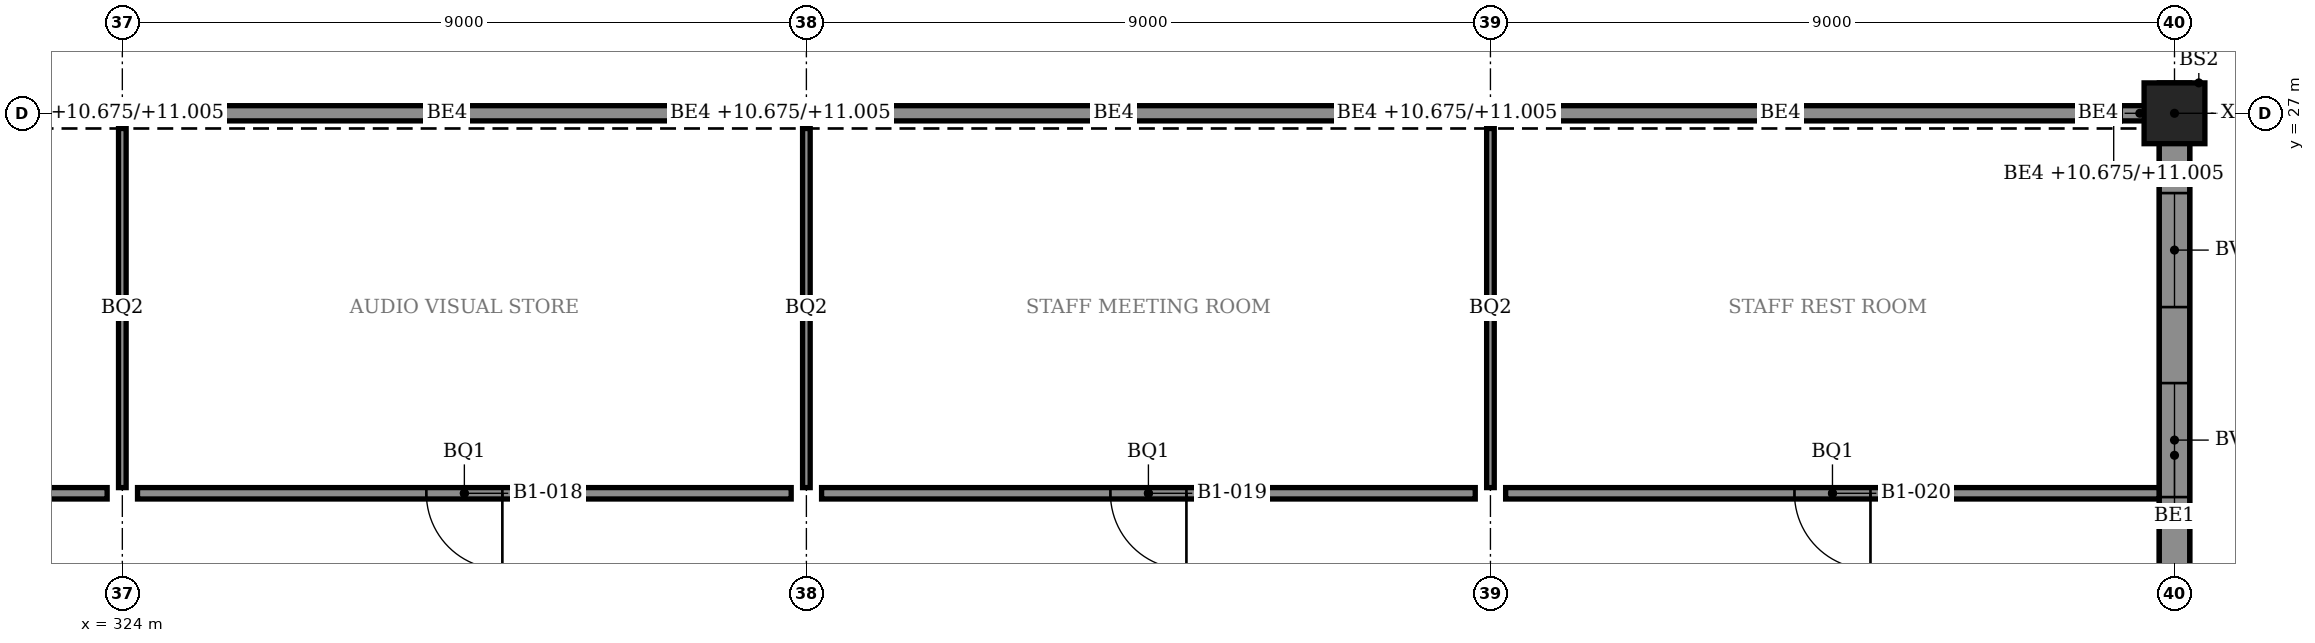
"""IFC4 building model, lengths in metres.
Left out: names, types, materials, properties, quantities, classifications, styles, units other than length and angle.
Written with IfcOpenShell. Run it as: python <this file> out.ifc"""

import sys

from ifc_helpers import new_model, si_unit, direction, frame, frame_2d, origin, origin_2d, place, context, subcontext, project, spatial, rectangle, extrude, element, fill, save


model = new_model("IFC4")
c1 = context("Model", 3, precision=1e-05, world=origin(), true_north=direction((0.0, 1.0)))
c2 = subcontext(c1, "Body", "Model", "MODEL_VIEW")
j1 = project(units=[si_unit("LENGTHUNIT", "METRE"), si_unit("PLANEANGLEUNIT", "RADIAN")], contexts=[c1])
p1 = place(None, origin())
s1 = spatial("IfcSite", under=j1, at=p1, CompositionType="ELEMENT")
p2 = place(p1, origin())
s2 = spatial("IfcBuilding", under=s1, at=p2, CompositionType="ELEMENT")
p3 = place(p2, frame((0.0, 0.0, 6.0)))
s3 = spatial("IfcBuildingStorey", under=s2, at=p3, CompositionType="ELEMENT", Elevation=6.0)
p4 = place(p3, frame((351.0, 27.0, 0.0), z_axis=(0.0, 0.0, 1.0), x_axis=(1.0, 0.0, 0.0)))
e1 = element("IfcColumn", 1, at=p4, inside=s3, PredefinedType="COLUMN", context=c2, shape_type="SweptSolid", body=[
    extrude(rectangle(XDim=0.8, YDim=0.8, at=origin_2d()), origin(), (0.0, 0.0, 1.0), 3.75),
])
p5 = place(p2, origin())
s4 = spatial("IfcBuildingStorey", under=s2, at=p5, CompositionType="ELEMENT", Elevation=0.0)
p6 = place(p5, frame((288.4, 27.0, -0.3), z_axis=(0.0, 0.0, 1.0), x_axis=(1.0, 0.0, 0.0)))
e2 = element("IfcWall", 2, at=p6, inside=s4, PredefinedType="SHEAR", context=c2, shape_type="SweptSolid", body=[
    extrude(rectangle(XDim=62.2, YDim=0.4, at=frame_2d((31.1, 0.0))), origin(), (0.0, 0.0, 1.0), 10.625),
])
p7 = place(p6, frame((22.4, 0.0, 0.3)))
e3 = element("IfcOpeningElement", 3, at=p7, cuts=e2, PredefinedType="OPENING", context=c2, shape_type="SweptSolid", body=[
    extrude(rectangle(XDim=2.4, YDim=2.4, at=frame_2d((1.2, 1.2))), frame((0.0, 0.21, 0.0), z_axis=(0.0, -1.0, 0.0), x_axis=(1.0, 0.0, 0.0)), (0.0, 0.0, 1.0), 0.42),
])
p8 = place(p6, frame((38.9, 0.0, 0.3)))
e4 = element("IfcOpeningElement", 4, at=p8, cuts=e2, PredefinedType="OPENING", context=c2, shape_type="SweptSolid", body=[
    extrude(rectangle(XDim=2.4, YDim=2.4, at=frame_2d((1.2, 1.2))), frame((0.0, 0.21, 0.0), z_axis=(0.0, -1.0, 0.0), x_axis=(1.0, 0.0, 0.0)), (0.0, 0.0, 1.0), 0.42),
])
p9 = place(p3, frame((351.0, 18.4, 0.0), z_axis=(0.0, 0.0, 1.0), x_axis=(0.0, 1.0, 0.0)))
e5 = element("IfcWall", 5, at=p9, inside=s3, PredefinedType="STANDARD", context=c2, shape_type="SweptSolid", body=[
    extrude(rectangle(XDim=8.2, YDim=0.4, at=frame_2d((4.1, 0.0))), origin(), (0.0, 0.0, 1.0), 3.05),
])
p10 = place(p9, frame((1.05, 0.0, 0.9)))
e6 = element("IfcOpeningElement", 6, at=p10, cuts=e5, PredefinedType="OPENING", context=c2, shape_type="SweptSolid", body=[
    extrude(rectangle(XDim=1.5, YDim=1.8, at=frame_2d((0.75, 0.9))), frame((0.0, 0.21, 0.0), z_axis=(0.0, -1.0, 0.0), x_axis=(1.0, 0.0, 0.0)), (0.0, 0.0, 1.0), 0.42),
])
p11 = place(p9, frame((3.55, 0.0, 0.9)))
e7 = element("IfcOpeningElement", 7, at=p11, cuts=e5, PredefinedType="OPENING", context=c2, shape_type="SweptSolid", body=[
    extrude(rectangle(XDim=1.5, YDim=1.8, at=frame_2d((0.75, 0.9))), frame((0.0, 0.21, 0.0), z_axis=(0.0, -1.0, 0.0), x_axis=(1.0, 0.0, 0.0)), (0.0, 0.0, 1.0), 0.42),
])
p12 = place(p9, frame((6.05, 0.0, 0.9)))
e8 = element("IfcOpeningElement", 8, at=p12, cuts=e5, PredefinedType="OPENING", context=c2, shape_type="SweptSolid", body=[
    extrude(rectangle(XDim=1.5, YDim=1.8, at=frame_2d((0.75, 0.9))), frame((0.0, 0.21, 0.0), z_axis=(0.0, -1.0, 0.0), x_axis=(1.0, 0.0, 0.0)), (0.0, 0.0, 1.0), 0.42),
])
p13 = place(p3, frame((351.0, 9.2, 4.0), z_axis=(0.0, 0.0, 1.0), x_axis=(0.0, 1.0, 0.0)))
e9 = element("IfcWall", 9, at=p13, inside=s3, PredefinedType="PARAPET", context=c2, shape_type="SweptSolid", body=[
    extrude(rectangle(XDim=18.2, YDim=0.4, at=frame_2d((9.1, 0.0))), origin(), (0.0, 0.0, 1.0), 1.121),
])
p14 = place(p3, frame((315.202, 27.0, 4.325), z_axis=(0.0, 0.0, 1.0), x_axis=(1.0, 0.0, 0.0)))
e10 = element("IfcWall", 10, at=p14, inside=s3, PredefinedType="STANDARD", context=c2, shape_type="SweptSolid", body=[
    extrude(rectangle(XDim=8.596, YDim=0.2, at=frame_2d((4.298, 0.0))), origin(), (0.0, 0.0, 1.0), 1.061),
])
for number, where, z_axis, x_axis in (
    (11, (323.973, 27.0, 4.325), (0.0, 0.0, 1.0), (1.0, 0.0, 0.0)),
    (12, (332.745, 27.0, 4.325), (0.0, 0.0, 1.0), (1.0, 0.0, 0.0)),
    (13, (341.516, 27.0, 4.325), (0.0, 0.0, 1.0), (1.0, 0.0, 0.0)),
):
    element("IfcWall", number, at=place(p3, frame(where, z_axis=z_axis, x_axis=x_axis)), inside=s3, PredefinedType="STANDARD", context=c2, shape_type="SweptSolid", body=[
        extrude(rectangle(XDim=8.596, YDim=0.2, at=frame_2d((4.298, 0.0))), origin(), (0.0, 0.0, 1.0), 1.061),
    ])
p15 = place(p3, frame((350.288, 27.0, 4.325), z_axis=(0.0, 0.0, 1.0), x_axis=(1.0, 0.0, 0.0)))
e14 = element("IfcWall", 14, at=p15, inside=s3, PredefinedType="STANDARD", context=c2, shape_type="SweptSolid", body=[
    extrude(rectangle(XDim=0.512, YDim=0.2, at=frame_2d((0.256, 0.0))), origin(), (0.0, 0.0, 1.0), 1.061),
])
for number, where, z_axis, x_axis in (
    (15, (323.798, 27.0, 4.675), (0.0, 0.0, 1.0), (1.0, 0.0, 0.0)),
    (16, (332.57, 27.0, 4.675), (0.0, 0.0, 1.0), (1.0, 0.0, 0.0)),
    (17, (341.341, 27.0, 4.675), (0.0, 0.0, 1.0), (1.0, 0.0, 0.0)),
    (18, (350.113, 27.0, 4.675), (0.0, 0.0, 1.0), (1.0, 0.0, 0.0)),
):
    element("IfcWall", number, at=place(p3, frame(where, z_axis=z_axis, x_axis=x_axis)), inside=s3, PredefinedType="STANDARD", context=c2, shape_type="SweptSolid", body=[
        extrude(rectangle(XDim=0.175, YDim=0.2, at=frame_2d((0.087, 0.0))), origin(), (0.0, 0.0, 1.0), 0.33),
    ])
p16 = place(p3, frame((315.2, 22.0, 0.0), z_axis=(0.0, 0.0, 1.0), x_axis=(1.0, 0.0, 0.0)))
e19 = element("IfcWall", 19, at=p16, inside=s3, PredefinedType="PARTITIONING", context=c2, shape_type="SweptSolid", body=[
    extrude(rectangle(XDim=8.6, YDim=0.15, at=frame_2d((4.3, 0.0))), origin(), (0.0, 0.0, 1.0), 3.75),
])
p17 = place(p3, frame((324.2, 22.0, 0.0), z_axis=(0.0, 0.0, 1.0), x_axis=(1.0, 0.0, 0.0)))
e20 = element("IfcWall", 20, at=p17, inside=s3, PredefinedType="PARTITIONING", context=c2, shape_type="SweptSolid", body=[
    extrude(rectangle(XDim=8.6, YDim=0.15, at=frame_2d((4.3, 0.0))), origin(), (0.0, 0.0, 1.0), 3.75),
])
p18 = place(p17, frame((3.8, 0.0, 0.0)))
e21 = element("IfcOpeningElement", 21, at=p18, cuts=e20, PredefinedType="OPENING", context=c2, shape_type="SweptSolid", body=[
    extrude(rectangle(XDim=1.0, YDim=2.4, at=frame_2d((0.5, 1.2))), frame((0.0, 0.085, 0.0), z_axis=(0.0, -1.0, 0.0), x_axis=(1.0, 0.0, 0.0)), (0.0, 0.0, 1.0), 0.17),
])
p19 = place(p3, frame((333.2, 22.0, 0.0), z_axis=(0.0, 0.0, 1.0), x_axis=(1.0, 0.0, 0.0)))
e22 = element("IfcWall", 22, at=p19, inside=s3, PredefinedType="PARTITIONING", context=c2, shape_type="SweptSolid", body=[
    extrude(rectangle(XDim=8.6, YDim=0.15, at=frame_2d((4.3, 0.0))), origin(), (0.0, 0.0, 1.0), 3.75),
])
p20 = place(p19, frame((3.8, 0.0, 0.0)))
e23 = element("IfcOpeningElement", 23, at=p20, cuts=e22, PredefinedType="OPENING", context=c2, shape_type="SweptSolid", body=[
    extrude(rectangle(XDim=1.0, YDim=2.4, at=frame_2d((0.5, 1.2))), frame((0.0, 0.085, 0.0), z_axis=(0.0, -1.0, 0.0), x_axis=(1.0, 0.0, 0.0)), (0.0, 0.0, 1.0), 0.17),
])
p21 = place(p3, frame((342.2, 22.0, 0.0), z_axis=(0.0, 0.0, 1.0), x_axis=(1.0, 0.0, 0.0)))
e24 = element("IfcWall", 24, at=p21, inside=s3, PredefinedType="PARTITIONING", context=c2, shape_type="SweptSolid", body=[
    extrude(rectangle(XDim=8.6, YDim=0.15, at=frame_2d((4.3, 0.0))), origin(), (0.0, 0.0, 1.0), 3.75),
])
p22 = place(p21, frame((3.8, 0.0, 0.0)))
e25 = element("IfcOpeningElement", 25, at=p22, cuts=e24, PredefinedType="OPENING", context=c2, shape_type="SweptSolid", body=[
    extrude(rectangle(XDim=1.0, YDim=2.4, at=frame_2d((0.5, 1.2))), frame((0.0, 0.085, 0.0), z_axis=(0.0, -1.0, 0.0), x_axis=(1.0, 0.0, 0.0)), (0.0, 0.0, 1.0), 0.17),
])
for number, where, z_axis, x_axis in (
    (26, (324.0, 22.075, 0.0), (0.0, 0.0, 1.0), (0.0, 1.0, 0.0)),
    (27, (333.0, 22.075, 0.0), (0.0, 0.0, 1.0), (0.0, 1.0, 0.0)),
    (28, (342.0, 22.075, 0.0), (0.0, 0.0, 1.0), (0.0, 1.0, 0.0)),
):
    element("IfcWall", number, at=place(p3, frame(where, z_axis=z_axis, x_axis=x_axis)), inside=s3, PredefinedType="PARTITIONING", context=c2, shape_type="SweptSolid", body=[
        extrude(rectangle(XDim=4.725, YDim=0.1, at=frame_2d((2.363, 0.0))), origin(), (0.0, 0.0, 1.0), 3.05),
    ])
p23 = place(p11, origin())
e29 = element("IfcWindow", 29, at=p23, inside=s3, PartitioningType="SINGLE_PANEL", PredefinedType="WINDOW", context=c2, shape_type="SweptSolid", body=[
    extrude(rectangle(XDim=1.5, YDim=1.8, at=frame_2d((0.75, 0.9))), frame((0.0, 0.03, 0.0), z_axis=(0.0, -1.0, 0.0), x_axis=(1.0, 0.0, 0.0)), (0.0, 0.0, 1.0), 0.06),
])
fill(e7, e29)
p24 = place(p12, origin())
e30 = element("IfcWindow", 30, at=p24, inside=s3, PartitioningType="SINGLE_PANEL", PredefinedType="WINDOW", context=c2, shape_type="SweptSolid", body=[
    extrude(rectangle(XDim=1.5, YDim=1.8, at=frame_2d((0.75, 0.9))), frame((0.0, 0.03, 0.0), z_axis=(0.0, -1.0, 0.0), x_axis=(1.0, 0.0, 0.0)), (0.0, 0.0, 1.0), 0.06),
])
fill(e8, e30)
p25 = place(p18, frame((1.0, 0.0, 0.0), z_axis=(0.0, 0.0, 1.0), x_axis=(-1.0, 0.0, 0.0)))
e31 = element("IfcDoor", 31, at=p25, inside=s3, OperationType="SINGLE_SWING_RIGHT", PredefinedType="DOOR", context=c2, shape_type="SweptSolid", body=[
    extrude(rectangle(XDim=1.0, YDim=2.4, at=frame_2d((0.5, 1.2))), frame((0.0, 0.025, 0.0), z_axis=(0.0, -1.0, 0.0), x_axis=(1.0, 0.0, 0.0)), (0.0, 0.0, 1.0), 0.05),
])
fill(e21, e31)
p26 = place(p20, frame((1.0, 0.0, 0.0), z_axis=(0.0, 0.0, 1.0), x_axis=(-1.0, 0.0, 0.0)))
e32 = element("IfcDoor", 32, at=p26, inside=s3, OperationType="SINGLE_SWING_RIGHT", PredefinedType="DOOR", context=c2, shape_type="SweptSolid", body=[
    extrude(rectangle(XDim=1.0, YDim=2.4, at=frame_2d((0.5, 1.2))), frame((0.0, 0.025, 0.0), z_axis=(0.0, -1.0, 0.0), x_axis=(1.0, 0.0, 0.0)), (0.0, 0.0, 1.0), 0.05),
])
fill(e23, e32)
p27 = place(p22, frame((1.0, 0.0, 0.0), z_axis=(0.0, 0.0, 1.0), x_axis=(-1.0, 0.0, 0.0)))
e33 = element("IfcDoor", 33, at=p27, inside=s3, OperationType="SINGLE_SWING_RIGHT", PredefinedType="DOOR", context=c2, shape_type="SweptSolid", body=[
    extrude(rectangle(XDim=1.0, YDim=2.4, at=frame_2d((0.5, 1.2))), frame((0.0, 0.025, 0.0), z_axis=(0.0, -1.0, 0.0), x_axis=(1.0, 0.0, 0.0)), (0.0, 0.0, 1.0), 0.05),
])
fill(e25, e33)
save(model, sys.argv[1])
